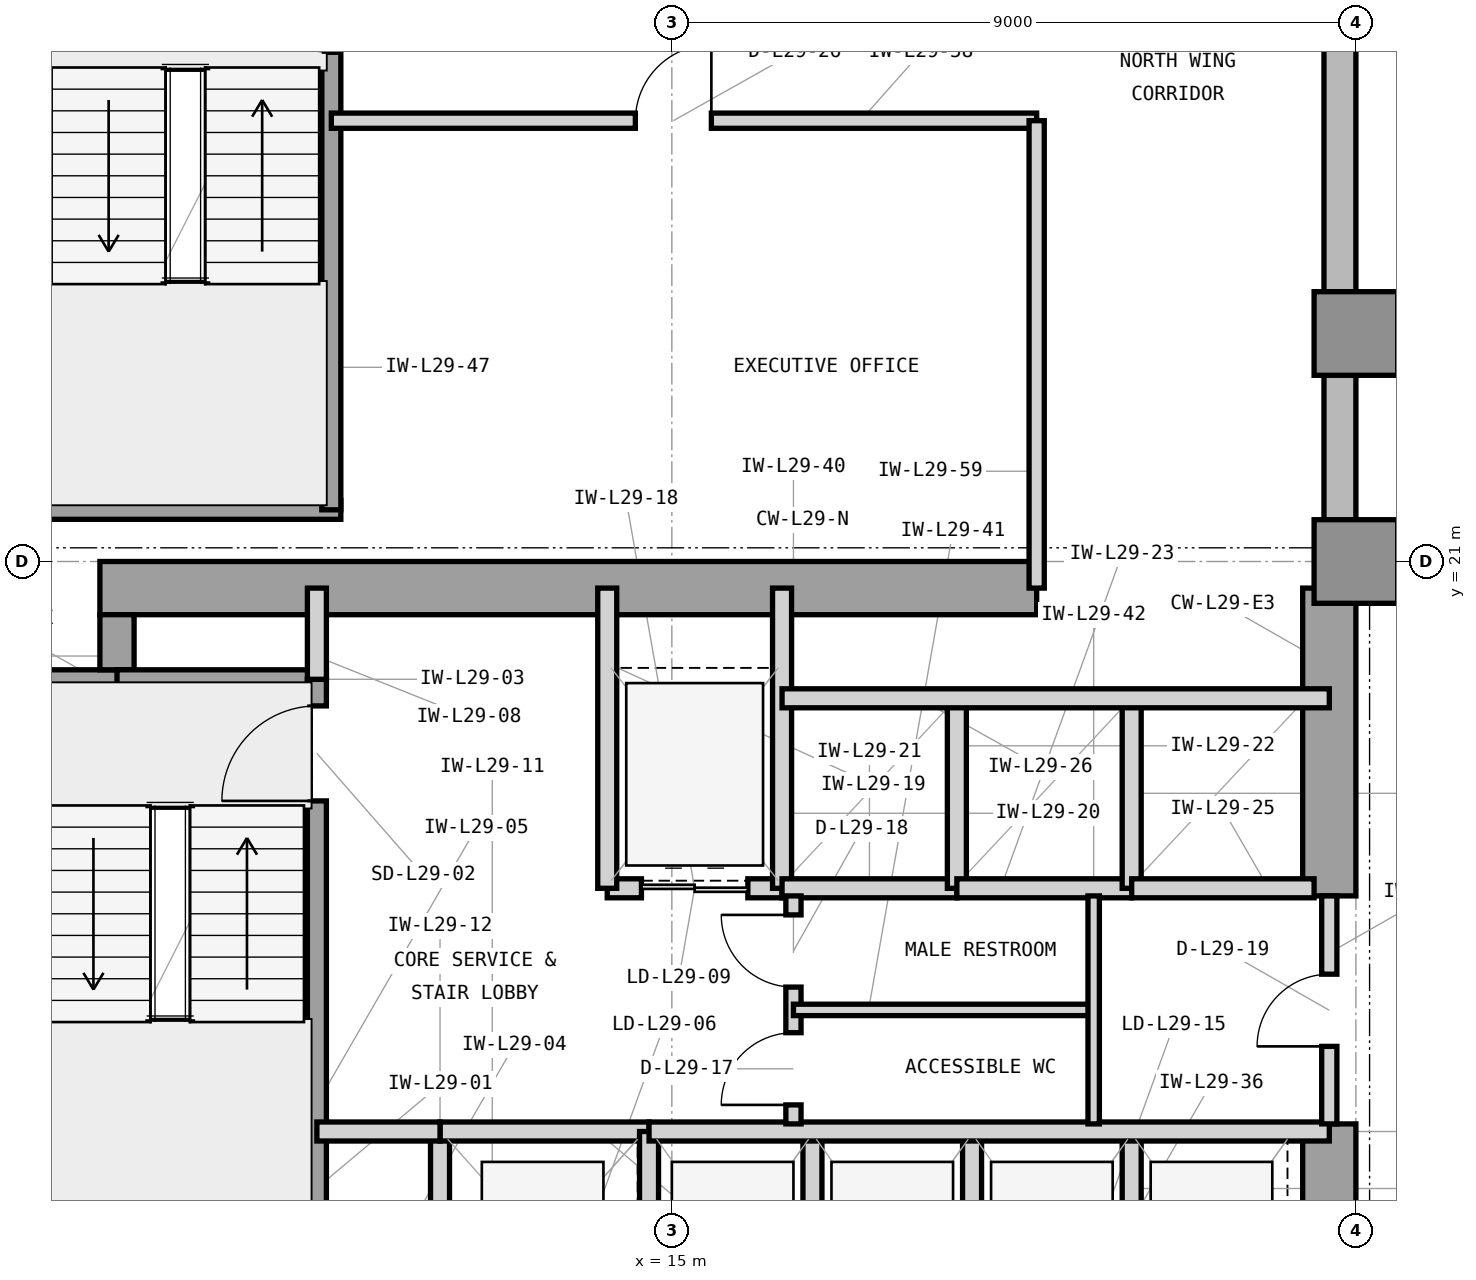
"""IFC4 building model, lengths in metres.
Left out: names, types, materials, properties, quantities, classifications, styles, units other than length and angle.
Written with IfcOpenShell. Run it as: python <this file> out.ifc"""

import sys

from ifc_helpers import new_model, si_unit, direction, frame, frame_2d, origin, origin_2d, place, context, subcontext, project, spatial, rectangle, extrude, element, fill, save


model = new_model("IFC4")
c1 = context("Model", 3, precision=1e-05, world=origin(), true_north=direction((0.0, 1.0)))
c2 = subcontext(c1, "Body", "Model", "MODEL_VIEW")
j1 = project(units=[si_unit("LENGTHUNIT", "METRE"), si_unit("PLANEANGLEUNIT", "RADIAN")], contexts=[c1])
p1 = place(None, origin())
s1 = spatial("IfcSite", under=j1, at=p1, CompositionType="ELEMENT")
p2 = place(p1, origin())
s2 = spatial("IfcBuilding", under=s1, at=p2, CompositionType="ELEMENT")
p3 = place(p2, frame((0.0, 0.0, 124.5)))
s3 = spatial("IfcBuildingStorey", under=s2, at=p3, CompositionType="ELEMENT", Elevation=124.5)
p4 = place(p3, frame((7.475, 20.65, 0.0), z_axis=(0.0, 0.0, 1.0), x_axis=(1.0, 0.0, 0.0)))
e1 = element("IfcWall", 1, at=p4, inside=s3, PredefinedType="SHEAR", context=c2, shape_type="SweptSolid", body=[
    extrude(rectangle(XDim=12.325, YDim=0.7, at=frame_2d((6.163, 0.0))), origin(), (0.0, 0.0, 1.0), 3.9),
])
p5 = place(p3, frame((23.65, 10.4, 0.0), z_axis=(0.0, 0.0, 1.0), x_axis=(0.0, 1.0, 0.0)))
e2 = element("IfcWall", 2, at=p5, inside=s3, PredefinedType="SHEAR", context=c2, shape_type="SweptSolid", body=[
    extrude(rectangle(XDim=3.2, YDim=0.7, at=frame_2d((1.6, 0.0))), origin(), (0.0, 0.0, 1.0), 3.9),
])
p6 = place(p3, frame((23.65, 16.6, 0.0), z_axis=(0.0, 0.0, 1.0), x_axis=(0.0, 1.0, 0.0)))
e3 = element("IfcWall", 3, at=p6, inside=s3, PredefinedType="SHEAR", context=c2, shape_type="SweptSolid", body=[
    extrude(rectangle(XDim=4.05, YDim=0.7, at=frame_2d((2.025, 0.0))), origin(), (0.0, 0.0, 1.0), 3.9),
])
p7 = place(p3, frame((6.7, 19.35, 0.0), z_axis=(0.0, 0.0, 1.0), x_axis=(1.0, 0.0, 0.0)))
e4 = element("IfcWall", 4, at=p7, inside=s3, PredefinedType="SHEAR", context=c2, shape_type="SweptSolid", body=[
    extrude(rectangle(XDim=1.225, YDim=0.45, at=frame_2d((0.613, 0.0))), origin(), (0.0, 0.0, 1.0), 3.9),
])
p8 = place(p3, frame((7.7, 19.575, 0.0), z_axis=(0.0, 0.0, 1.0), x_axis=(0.0, 1.0, 0.0)))
e5 = element("IfcWall", 5, at=p8, inside=s3, PredefinedType="SHEAR", context=c2, shape_type="SweptSolid", body=[
    extrude(rectangle(XDim=0.725, YDim=0.45, at=frame_2d((0.363, 0.0))), origin(), (0.0, 0.0, 1.0), 3.9),
])
for number, where, z_axis, x_axis in (
    (6, (24.0, 21.0, 0.0), (0.0, 0.0, 1.0), (1.0, 0.0, 0.0)),
    (7, (24.0, 24.0, 0.0), (0.0, 0.0, 1.0), (1.0, 0.0, 0.0)),
):
    element("IfcColumn", number, at=place(p3, frame(where, z_axis=z_axis, x_axis=x_axis)), inside=s3, PredefinedType="COLUMN", context=c2, shape_type="SweptSolid", body=[
        extrude(rectangle(XDim=1.1, YDim=1.1, at=origin_2d()), origin(), (0.0, 0.0, 1.0), 3.9),
    ])
p9 = place(p3, frame((61.4, 20.79, 0.0), z_axis=(0.0, 0.0, 1.0), x_axis=(-1.0, 0.0, 0.0)))
e8 = element("IfcWall", 8, at=p9, inside=s3, PredefinedType="STANDARD", context=c2, shape_type="SweptSolid", body=[
    extrude(rectangle(XDim=37.4, YDim=0.42, at=frame_2d((18.7, 0.0))), origin(), (0.0, 0.0, 1.0), 3.7),
])
p10 = place(p9, frame((15.113, 0.0, 0.85)))
e9 = element("IfcOpeningElement", 9, at=p10, cuts=e8, PredefinedType="OPENING", context=c2, shape_type="SweptSolid", body=[
    extrude(rectangle(XDim=2.5, YDim=2.25, at=frame_2d((1.25, 1.125))), frame((0.0, 0.22, 0.0), z_axis=(0.0, -1.0, 0.0), x_axis=(1.0, 0.0, 0.0)), (0.0, 0.0, 1.0), 0.44),
])
p11 = place(p9, frame((24.462, 0.0, 0.85)))
e10 = element("IfcOpeningElement", 10, at=p11, cuts=e8, PredefinedType="OPENING", context=c2, shape_type="SweptSolid", body=[
    extrude(rectangle(XDim=2.5, YDim=2.25, at=frame_2d((1.25, 1.125))), frame((0.0, 0.22, 0.0), z_axis=(0.0, -1.0, 0.0), x_axis=(1.0, 0.0, 0.0)), (0.0, 0.0, 1.0), 0.44),
])
p12 = place(p3, frame((23.79, 21.0, 0.0), z_axis=(0.0, 0.0, 1.0), x_axis=(0.0, 1.0, 0.0)))
e11 = element("IfcWall", 11, at=p12, inside=s3, PredefinedType="STANDARD", context=c2, shape_type="SweptSolid", body=[
    extrude(rectangle(XDim=25.4, YDim=0.42, at=frame_2d((12.7, 0.0))), origin(), (0.0, 0.0, 1.0), 3.7),
])
p13 = place(p12, frame((11.45, 0.0, 0.85)))
e12 = element("IfcOpeningElement", 12, at=p13, cuts=e11, PredefinedType="OPENING", context=c2, shape_type="SweptSolid", body=[
    extrude(rectangle(XDim=2.5, YDim=2.25, at=frame_2d((1.25, 1.125))), frame((0.0, 0.22, 0.0), z_axis=(0.0, -1.0, 0.0), x_axis=(1.0, 0.0, 0.0)), (0.0, 0.0, 1.0), 0.44),
])
p14 = place(p3, frame((7.7, 19.45, 0.0), z_axis=(0.0, 0.0, 1.0), x_axis=(1.0, 0.0, 0.0)))
e13 = element("IfcWall", 13, at=p14, inside=s3, PredefinedType="SHEAR", context=c2, shape_type="SweptSolid", body=[
    extrude(rectangle(XDim=2.755, YDim=0.25, at=frame_2d((1.377, 0.0))), origin(), (0.0, 0.0, 1.0), 3.9),
])
p15 = place(p3, frame((10.33, 12.0, 0.0), z_axis=(0.0, 0.0, 1.0), x_axis=(0.0, 1.0, 0.0)))
e14 = element("IfcWall", 14, at=p15, inside=s3, PredefinedType="SHEAR", context=c2, shape_type="SweptSolid", body=[
    extrude(rectangle(XDim=7.45, YDim=0.25, at=frame_2d((3.725, 0.0))), origin(), (0.0, 0.0, 1.0), 3.9),
])
p16 = place(p15, frame((5.85, 0.0, 0.0)))
e15 = element("IfcOpeningElement", 15, at=p16, cuts=e14, PredefinedType="OPENING", context=c2, shape_type="SweptSolid", body=[
    extrude(rectangle(XDim=1.25, YDim=2.2, at=frame_2d((0.625, 1.1))), frame((0.0, 0.135, 0.0), z_axis=(0.0, -1.0, 0.0), x_axis=(1.0, 0.0, 0.0)), (0.0, 0.0, 1.0), 0.27),
])
p17 = place(p3, frame((10.33, 19.45, 0.0), z_axis=(0.0, 0.0, 1.0), x_axis=(0.0, 1.0, 0.0)))
e16 = element("IfcWall", 16, at=p17, inside=s3, PredefinedType="PARTITIONING", context=c2, shape_type="SweptSolid", body=[
    extrude(rectangle(XDim=1.2, YDim=0.25, at=frame_2d((0.6, 0.0))), origin(), (0.0, 0.0, 1.0), 2.994),
])
p18 = place(p3, frame((11.95, 10.5, 0.0), z_axis=(0.0, 0.0, 1.0), x_axis=(0.0, 1.0, 0.0)))
e17 = element("IfcWall", 17, at=p18, inside=s3, PredefinedType="PARTITIONING", context=c2, shape_type="SweptSolid", body=[
    extrude(rectangle(XDim=3.0, YDim=0.25, at=frame_2d((1.5, 0.0))), origin(), (0.0, 0.0, 1.0), 3.69),
])
p19 = place(p3, frame((11.95, 13.5, 0.0), z_axis=(0.0, 0.0, 1.0), x_axis=(1.0, 0.0, 0.0)))
e18 = element("IfcWall", 18, at=p19, inside=s3, PredefinedType="PARTITIONING", context=c2, shape_type="SweptSolid", body=[
    extrude(rectangle(XDim=2.75, YDim=0.25, at=frame_2d((1.375, 0.0))), origin(), (0.0, 0.0, 1.0), 3.233),
])
p20 = place(p3, frame((14.7, 10.5, 0.0), z_axis=(0.0, 0.0, 1.0), x_axis=(0.0, 1.0, 0.0)))
e19 = element("IfcWall", 19, at=p20, inside=s3, PredefinedType="PARTITIONING", context=c2, shape_type="SweptSolid", body=[
    extrude(rectangle(XDim=3.0, YDim=0.25, at=frame_2d((1.5, 0.0))), origin(), (0.0, 0.0, 1.0), 3.69),
])
p21 = place(p3, frame((10.33, 13.5, 0.0), z_axis=(0.0, 0.0, 1.0), x_axis=(1.0, 0.0, 0.0)))
e20 = element("IfcWall", 20, at=p21, inside=s3, PredefinedType="PARTITIONING", context=c2, shape_type="SweptSolid", body=[
    extrude(rectangle(XDim=1.62, YDim=0.25, at=frame_2d((0.81, 0.0))), origin(), (0.0, 0.0, 1.0), 3.233),
])
p22 = place(p3, frame((14.15, 16.7, 0.0), z_axis=(0.0, 0.0, 1.0), x_axis=(1.0, 0.0, 0.0)))
e21 = element("IfcWall", 21, at=p22, inside=s3, PredefinedType="PARTITIONING", context=c2, shape_type="SweptSolid", body=[
    extrude(rectangle(XDim=2.3, YDim=0.25, at=frame_2d((1.15, 0.0))), origin(), (0.0, 0.0, 1.0), 3.233),
])
p23 = place(p22, frame((0.45, 0.0, 0.0)))
e22 = element("IfcOpeningElement", 22, at=p23, cuts=e21, PredefinedType="OPENING", context=c2, shape_type="SweptSolid", body=[
    extrude(rectangle(XDim=1.4, YDim=2.35, at=frame_2d((0.7, 1.175))), frame((0.0, 0.135, 0.0), z_axis=(0.0, -1.0, 0.0), x_axis=(1.0, 0.0, 0.0)), (0.0, 0.0, 1.0), 0.27),
])
for number, where, z_axis, x_axis in (
    (23, (14.15, 16.7, 0.0), (0.0, 0.0, 1.0), (0.0, 1.0, 0.0)),
    (24, (16.45, 16.7, 0.0), (0.0, 0.0, 1.0), (0.0, 1.0, 0.0)),
):
    element("IfcWall", number, at=place(p3, frame(where, z_axis=z_axis, x_axis=x_axis)), inside=s3, PredefinedType="PARTITIONING", context=c2, shape_type="SweptSolid", body=[
        extrude(rectangle(XDim=3.95, YDim=0.25, at=frame_2d((1.975, 0.0))), origin(), (0.0, 0.0, 1.0), 3.69),
    ])
p24 = place(p3, frame((16.45, 16.7, 0.0), z_axis=(0.0, 0.0, 1.0), x_axis=(1.0, 0.0, 0.0)))
e25 = element("IfcWall", 25, at=p24, inside=s3, PredefinedType="PARTITIONING", context=c2, shape_type="SweptSolid", body=[
    extrude(rectangle(XDim=2.3, YDim=0.25, at=frame_2d((1.15, 0.0))), origin(), (0.0, 0.0, 1.0), 3.233),
])
p25 = place(p3, frame((18.75, 16.7, 0.0), z_axis=(0.0, 0.0, 1.0), x_axis=(0.0, 1.0, 0.0)))
e26 = element("IfcWall", 26, at=p25, inside=s3, PredefinedType="PARTITIONING", context=c2, shape_type="SweptSolid", body=[
    extrude(rectangle(XDim=2.5, YDim=0.25, at=frame_2d((1.25, 0.0))), origin(), (0.0, 0.0, 1.0), 3.69),
])
p26 = place(p3, frame((18.75, 16.7, 0.0), z_axis=(0.0, 0.0, 1.0), x_axis=(1.0, 0.0, 0.0)))
e27 = element("IfcWall", 27, at=p26, inside=s3, PredefinedType="PARTITIONING", context=c2, shape_type="SweptSolid", body=[
    extrude(rectangle(XDim=2.3, YDim=0.25, at=frame_2d((1.15, 0.0))), origin(), (0.0, 0.0, 1.0), 3.233),
])
p27 = place(p3, frame((21.05, 16.7, 0.0), z_axis=(0.0, 0.0, 1.0), x_axis=(0.0, 1.0, 0.0)))
e28 = element("IfcWall", 28, at=p27, inside=s3, PredefinedType="PARTITIONING", context=c2, shape_type="SweptSolid", body=[
    extrude(rectangle(XDim=2.5, YDim=0.25, at=frame_2d((1.25, 0.0))), origin(), (0.0, 0.0, 1.0), 3.69),
])
p28 = place(p3, frame((21.05, 16.7, 0.0), z_axis=(0.0, 0.0, 1.0), x_axis=(1.0, 0.0, 0.0)))
e29 = element("IfcWall", 29, at=p28, inside=s3, PredefinedType="PARTITIONING", context=c2, shape_type="SweptSolid", body=[
    extrude(rectangle(XDim=2.4, YDim=0.25, at=frame_2d((1.2, 0.0))), origin(), (0.0, 0.0, 1.0), 3.233),
])
p29 = place(p3, frame((16.45, 19.2, 0.0), z_axis=(0.0, 0.0, 1.0), x_axis=(1.0, 0.0, 0.0)))
e30 = element("IfcWall", 30, at=p29, inside=s3, PredefinedType="PARTITIONING", context=c2, shape_type="SweptSolid", body=[
    extrude(rectangle(XDim=7.2, YDim=0.25, at=frame_2d((3.6, 0.0))), origin(), (0.0, 0.0, 1.0), 3.69),
])
for number, where, z_axis, x_axis in (
    (31, (16.85, 10.5, 0.0), (0.0, 0.0, 1.0), (0.0, 1.0, 0.0)),
    (32, (18.95, 10.5, 0.0), (0.0, 0.0, 1.0), (0.0, 1.0, 0.0)),
    (33, (21.05, 10.5, 0.0), (0.0, 0.0, 1.0), (0.0, 1.0, 0.0)),
):
    element("IfcWall", number, at=place(p3, frame(where, z_axis=z_axis, x_axis=x_axis)), inside=s3, PredefinedType="PARTITIONING", context=c2, shape_type="SweptSolid", body=[
        extrude(rectangle(XDim=3.0, YDim=0.25, at=frame_2d((1.5, 0.0))), origin(), (0.0, 0.0, 1.0), 3.69),
    ])
p30 = place(p3, frame((14.7, 13.5, 0.0), z_axis=(0.0, 0.0, 1.0), x_axis=(1.0, 0.0, 0.0)))
e34 = element("IfcWall", 34, at=p30, inside=s3, PredefinedType="PARTITIONING", context=c2, shape_type="SweptSolid", body=[
    extrude(rectangle(XDim=8.95, YDim=0.25, at=frame_2d((4.475, 0.0))), origin(), (0.0, 0.0, 1.0), 3.233),
])
p31 = place(p3, frame((16.6, 13.6, 0.0), z_axis=(0.0, 0.0, 1.0), x_axis=(0.0, 1.0, 0.0)))
e35 = element("IfcWall", 35, at=p31, inside=s3, PredefinedType="PARTITIONING", context=c2, shape_type="SweptSolid", body=[
    extrude(rectangle(XDim=3.0, YDim=0.2, at=frame_2d((1.5, 0.0))), origin(), (0.0, 0.0, 1.0), 3.69),
])
p32 = place(p31, frame((0.25, 0.0, 0.0)))
e36 = element("IfcOpeningElement", 36, at=p32, cuts=e35, PredefinedType="OPENING", context=c2, shape_type="SweptSolid", body=[
    extrude(rectangle(XDim=0.95, YDim=2.1, at=frame_2d((0.475, 1.05))), frame((0.0, 0.11, 0.0), z_axis=(0.0, -1.0, 0.0), x_axis=(1.0, 0.0, 0.0)), (0.0, 0.0, 1.0), 0.22),
])
p33 = place(p31, frame((1.8, 0.0, 0.0)))
e37 = element("IfcOpeningElement", 37, at=p33, cuts=e35, PredefinedType="OPENING", context=c2, shape_type="SweptSolid", body=[
    extrude(rectangle(XDim=0.95, YDim=2.1, at=frame_2d((0.475, 1.05))), frame((0.0, 0.11, 0.0), z_axis=(0.0, -1.0, 0.0), x_axis=(1.0, 0.0, 0.0)), (0.0, 0.0, 1.0), 0.22),
])
p34 = place(p3, frame((16.6, 15.1, 0.0), z_axis=(0.0, 0.0, 1.0), x_axis=(1.0, 0.0, 0.0)))
e38 = element("IfcWall", 38, at=p34, inside=s3, PredefinedType="PARTITIONING", context=c2, shape_type="SweptSolid", body=[
    extrude(rectangle(XDim=3.95, YDim=0.15, at=frame_2d((1.975, 0.0))), origin(), (0.0, 0.0, 1.0), 3.69),
])
p35 = place(p3, frame((20.55, 13.6, 0.0), z_axis=(0.0, 0.0, 1.0), x_axis=(0.0, 1.0, 0.0)))
e39 = element("IfcWall", 39, at=p35, inside=s3, PredefinedType="PARTITIONING", context=c2, shape_type="SweptSolid", body=[
    extrude(rectangle(XDim=3.0, YDim=0.15, at=frame_2d((1.5, 0.0))), origin(), (0.0, 0.0, 1.0), 3.69),
])
p36 = place(p3, frame((23.65, 13.6, 0.0), z_axis=(0.0, 0.0, 1.0), x_axis=(0.0, 1.0, 0.0)))
e40 = element("IfcWall", 40, at=p36, inside=s3, PredefinedType="PARTITIONING", context=c2, shape_type="SweptSolid", body=[
    extrude(rectangle(XDim=3.0, YDim=0.2, at=frame_2d((1.5, 0.0))), origin(), (0.0, 0.0, 1.0), 3.69),
])
p37 = place(p36, frame((1.02, 0.0, 0.0)))
e41 = element("IfcOpeningElement", 41, at=p37, cuts=e40, PredefinedType="OPENING", context=c2, shape_type="SweptSolid", body=[
    extrude(rectangle(XDim=0.95, YDim=2.1, at=frame_2d((0.475, 1.05))), frame((0.0, 0.11, 0.0), z_axis=(0.0, -1.0, 0.0), x_axis=(1.0, 0.0, 0.0)), (0.0, 0.0, 1.0), 0.22),
])
p38 = place(p3, frame((6.555, 21.68, 0.0), z_axis=(0.0, 0.0, 1.0), x_axis=(1.0, 0.0, 0.0)))
e42 = element("IfcWall", 42, at=p38, inside=s3, PredefinedType="SHEAR", context=c2, shape_type="SweptSolid", body=[
    extrude(rectangle(XDim=4.09, YDim=0.25, at=frame_2d((2.045, 0.0))), origin(), (0.0, 0.0, 1.0), 3.9),
])
p39 = place(p3, frame((10.52, 21.68, 0.0), z_axis=(0.0, 0.0, 1.0), x_axis=(0.0, 1.0, 0.0)))
e43 = element("IfcWall", 43, at=p39, inside=s3, PredefinedType="SHEAR", context=c2, shape_type="SweptSolid", body=[
    extrude(rectangle(XDim=7.5, YDim=0.25, at=frame_2d((3.75, 0.0))), origin(), (0.0, 0.0, 1.0), 3.9),
])
p40 = place(p39, frame((6.02, 0.0, 0.0)))
e44 = element("IfcOpeningElement", 44, at=p40, cuts=e43, PredefinedType="OPENING", context=c2, shape_type="SweptSolid", body=[
    extrude(rectangle(XDim=1.25, YDim=2.2, at=frame_2d((0.625, 1.1))), frame((0.0, 0.135, 0.0), z_axis=(0.0, -1.0, 0.0), x_axis=(1.0, 0.0, 0.0)), (0.0, 0.0, 1.0), 0.27),
])
p41 = place(p3, frame((10.52, 26.8, 0.0), z_axis=(0.0, 0.0, 1.0), x_axis=(1.0, 0.0, 0.0)))
e45 = element("IfcWall", 45, at=p41, inside=s3, PredefinedType="PARTITIONING", context=c2, shape_type="SweptSolid", body=[
    extrude(rectangle(XDim=9.28, YDim=0.2, at=frame_2d((4.64, 0.0))), origin(), (0.0, 0.0, 1.0), 3.69),
])
p42 = place(p41, frame((4.0, 0.0, 0.0)))
e46 = element("IfcOpeningElement", 46, at=p42, cuts=e45, PredefinedType="OPENING", context=c2, shape_type="SweptSolid", body=[
    extrude(rectangle(XDim=1.0, YDim=2.15, at=frame_2d((0.5, 1.075))), frame((0.0, 0.11, 0.0), z_axis=(0.0, -1.0, 0.0), x_axis=(1.0, 0.0, 0.0)), (0.0, 0.0, 1.0), 0.22),
])
p43 = place(p3, frame((19.8, 20.65, 0.0), z_axis=(0.0, 0.0, 1.0), x_axis=(0.0, 1.0, 0.0)))
e47 = element("IfcWall", 47, at=p43, inside=s3, PredefinedType="PARTITIONING", context=c2, shape_type="SweptSolid", body=[
    extrude(rectangle(XDim=6.15, YDim=0.2, at=frame_2d((3.075, 0.0))), origin(), (0.0, 0.0, 1.0), 3.69),
])
p44 = place(p16, origin())
e48 = element("IfcDoor", 48, at=p44, inside=s3, OperationType="SINGLE_SWING_LEFT", PredefinedType="DOOR", context=c2, shape_type="SweptSolid", body=[
    extrude(rectangle(XDim=1.25, YDim=2.2, at=frame_2d((0.625, 1.1))), frame((0.0, 0.025, 0.0), z_axis=(0.0, -1.0, 0.0), x_axis=(1.0, 0.0, 0.0)), (0.0, 0.0, 1.0), 0.05),
])
fill(e15, e48)
p45 = place(p23, origin())
e49 = element("IfcDoor", 49, at=p45, inside=s3, OperationType="DOUBLE_DOOR_SLIDING", PredefinedType="DOOR", context=c2, shape_type="SweptSolid", body=[
    extrude(rectangle(XDim=1.4, YDim=2.35, at=frame_2d((0.7, 1.175))), frame((0.0, 0.025, 0.0), z_axis=(0.0, -1.0, 0.0), x_axis=(1.0, 0.0, 0.0)), (0.0, 0.0, 1.0), 0.05),
])
fill(e22, e49)
p46 = place(p32, origin())
e50 = element("IfcDoor", 50, at=p46, inside=s3, OperationType="SINGLE_SWING_LEFT", PredefinedType="DOOR", context=c2, shape_type="SweptSolid", body=[
    extrude(rectangle(XDim=0.95, YDim=2.1, at=frame_2d((0.475, 1.05))), frame((0.0, 0.025, 0.0), z_axis=(0.0, -1.0, 0.0), x_axis=(1.0, 0.0, 0.0)), (0.0, 0.0, 1.0), 0.05),
])
fill(e36, e50)
p47 = place(p33, origin())
e51 = element("IfcDoor", 51, at=p47, inside=s3, OperationType="SINGLE_SWING_RIGHT", PredefinedType="DOOR", context=c2, shape_type="SweptSolid", body=[
    extrude(rectangle(XDim=0.95, YDim=2.1, at=frame_2d((0.475, 1.05))), frame((0.0, 0.025, 0.0), z_axis=(0.0, -1.0, 0.0), x_axis=(1.0, 0.0, 0.0)), (0.0, 0.0, 1.0), 0.05),
])
fill(e37, e51)
p48 = place(p37, origin())
e52 = element("IfcDoor", 52, at=p48, inside=s3, OperationType="SINGLE_SWING_LEFT", PredefinedType="DOOR", context=c2, shape_type="SweptSolid", body=[
    extrude(rectangle(XDim=0.95, YDim=2.1, at=frame_2d((0.475, 1.05))), frame((0.0, 0.025, 0.0), z_axis=(0.0, -1.0, 0.0), x_axis=(1.0, 0.0, 0.0)), (0.0, 0.0, 1.0), 0.05),
])
fill(e41, e52)
p49 = place(p42, origin())
e53 = element("IfcDoor", 53, at=p49, inside=s3, OperationType="SINGLE_SWING_RIGHT", PredefinedType="DOOR", context=c2, shape_type="SweptSolid", body=[
    extrude(rectangle(XDim=1.0, YDim=2.15, at=frame_2d((0.5, 1.075))), frame((0.0, 0.025, 0.0), z_axis=(0.0, -1.0, 0.0), x_axis=(1.0, 0.0, 0.0)), (0.0, 0.0, 1.0), 0.05),
])
fill(e46, e53)
save(model, sys.argv[1])
